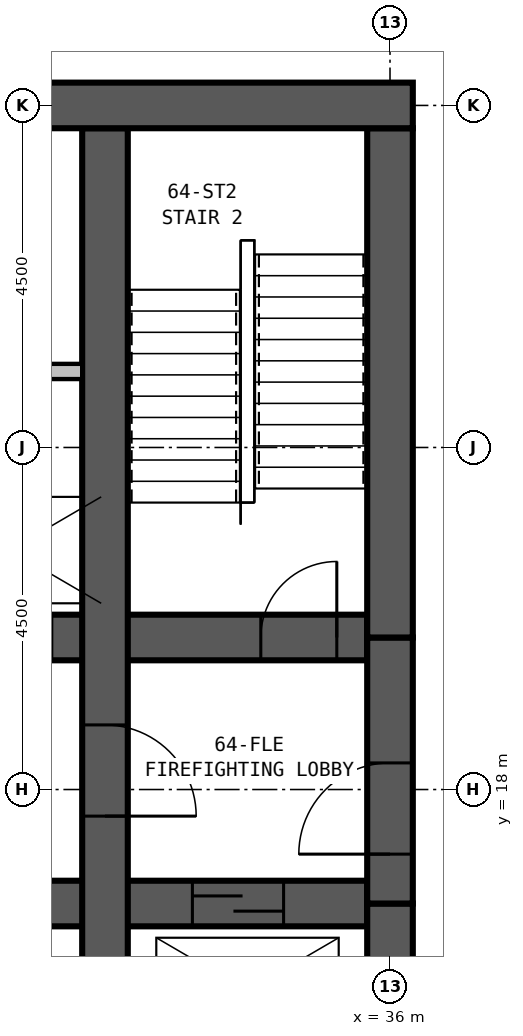
"""IFC4 building model, lengths in metres.
Left out: names, types, materials, properties, quantities, classifications, styles, units other than length and angle.
Written with IfcOpenShell. Run it as: python <this file> out.ifc"""

import sys

from ifc_helpers import new_model, si_unit, direction, frame, frame_2d, origin, place, context, subcontext, project, spatial, rectangle, extrude, element, fill, save


model = new_model("IFC4")
c1 = context("Model", 3, precision=1e-05, world=origin(), true_north=direction((0.0, 1.0)))
c2 = subcontext(c1, "Body", "Model", "MODEL_VIEW")
j1 = project(units=[si_unit("LENGTHUNIT", "METRE"), si_unit("PLANEANGLEUNIT", "RADIAN")], contexts=[c1])
p1 = place(None, origin())
s1 = spatial("IfcSite", under=j1, at=p1, CompositionType="ELEMENT")
p2 = place(p1, origin())
s2 = spatial("IfcBuilding", under=s1, at=p2, CompositionType="ELEMENT")
p3 = place(p2, frame((0.0, 0.0, 250.7)))
s3 = spatial("IfcBuildingStorey", under=s2, at=p3, CompositionType="ELEMENT", Elevation=250.7)
p4 = place(p3, frame((36.3, 27.0, 0.0), z_axis=(0.0, 0.0, 1.0), x_axis=(-1.0, 0.0, 0.0)))
e1 = element("IfcWall", 1, at=p4, inside=s3, PredefinedType="SHEAR", context=c2, shape_type="SweptSolid", body=[
    extrude(rectangle(XDim=23.6, YDim=0.6, at=frame_2d((11.8, 0.0))), origin(), (0.0, 0.0, 1.0), 3.9),
])
p5 = place(p4, frame((17.05, 0.0, 0.0)))
e2 = element("IfcOpeningElement", 2, at=p5, cuts=e1, PredefinedType="OPENING", context=c2, shape_type="SweptSolid", body=[
    extrude(rectangle(XDim=1.0, YDim=2.1, at=frame_2d((0.5, 1.05))), frame((0.0, 0.31, 0.0), z_axis=(0.0, -1.0, 0.0), x_axis=(1.0, 0.0, 0.0)), (0.0, 0.0, 1.0), 0.62),
])
p6 = place(p4, frame((12.05, 0.0, 0.0)))
e3 = element("IfcOpeningElement", 3, at=p6, cuts=e1, PredefinedType="OPENING", context=c2, shape_type="SweptSolid", body=[
    extrude(rectangle(XDim=1.0, YDim=2.1, at=frame_2d((0.5, 1.05))), frame((0.0, 0.31, 0.0), z_axis=(0.0, -1.0, 0.0), x_axis=(1.0, 0.0, 0.0)), (0.0, 0.0, 1.0), 0.62),
])
p7 = place(p4, frame((7.05, 0.0, 0.0)))
e4 = element("IfcOpeningElement", 4, at=p7, cuts=e1, PredefinedType="OPENING", context=c2, shape_type="SweptSolid", body=[
    extrude(rectangle(XDim=1.0, YDim=2.1, at=frame_2d((0.5, 1.05))), frame((0.0, 0.31, 0.0), z_axis=(0.0, -1.0, 0.0), x_axis=(1.0, 0.0, 0.0)), (0.0, 0.0, 1.0), 0.62),
])
p8 = place(p3, frame((32.25, 13.8, 0.0), z_axis=(0.0, 0.0, 1.0), x_axis=(0.0, 1.0, 0.0)))
e5 = element("IfcWall", 5, at=p8, inside=s3, PredefinedType="SHEAR", context=c2, shape_type="SweptSolid", body=[
    extrude(rectangle(XDim=12.9, YDim=0.6, at=frame_2d((6.45, 0.0))), origin(), (0.0, 0.0, 1.0), 3.9),
])
p9 = place(p8, frame((5.05, 0.0, 0.0), z_axis=(0.0, 0.0, 1.0), x_axis=(-1.0, 0.0, 0.0)))
e6 = element("IfcOpeningElement", 6, at=p9, cuts=e5, PredefinedType="OPENING", context=c2, shape_type="SweptSolid", body=[
    extrude(rectangle(XDim=1.2, YDim=2.1, at=frame_2d((0.6, 1.05))), frame((0.0, 0.31, 0.0), z_axis=(0.0, -1.0, 0.0), x_axis=(1.0, 0.0, 0.0)), (0.0, 0.0, 1.0), 0.62),
])
p10 = place(p3, frame((13.8, 16.5, 0.0), z_axis=(0.0, 0.0, 1.0), x_axis=(1.0, 0.0, 0.0)))
e7 = element("IfcWall", 7, at=p10, inside=s3, PredefinedType="SHEAR", context=c2, shape_type="SweptSolid", body=[
    extrude(rectangle(XDim=21.9, YDim=0.6, at=frame_2d((10.95, 0.0))), origin(), (0.0, 0.0, 1.0), 3.9),
])
p11 = place(p10, frame((5.75, 0.0, 0.0), z_axis=(0.0, 0.0, 1.0), x_axis=(-1.0, 0.0, 0.0)))
e8 = element("IfcOpeningElement", 8, at=p11, cuts=e7, PredefinedType="OPENING", context=c2, shape_type="SweptSolid", body=[
    extrude(rectangle(XDim=1.0, YDim=2.1, at=frame_2d((0.5, 1.05))), frame((0.0, 0.31, 0.0), z_axis=(0.0, -1.0, 0.0), x_axis=(1.0, 0.0, 0.0)), (0.0, 0.0, 1.0), 0.62),
])
p12 = place(p10, frame((10.2, 0.0, 0.0), z_axis=(0.0, 0.0, 1.0), x_axis=(-1.0, 0.0, 0.0)))
e9 = element("IfcOpeningElement", 9, at=p12, cuts=e7, PredefinedType="OPENING", context=c2, shape_type="SweptSolid", body=[
    extrude(rectangle(XDim=1.0, YDim=2.1, at=frame_2d((0.5, 1.05))), frame((0.0, 0.31, 0.0), z_axis=(0.0, -1.0, 0.0), x_axis=(1.0, 0.0, 0.0)), (0.0, 0.0, 1.0), 0.62),
])
p13 = place(p10, frame((12.7, 0.0, 0.0), z_axis=(0.0, 0.0, 1.0), x_axis=(-1.0, 0.0, 0.0)))
e10 = element("IfcOpeningElement", 10, at=p13, cuts=e7, PredefinedType="OPENING", context=c2, shape_type="SweptSolid", body=[
    extrude(rectangle(XDim=1.0, YDim=2.1, at=frame_2d((0.5, 1.05))), frame((0.0, 0.31, 0.0), z_axis=(0.0, -1.0, 0.0), x_axis=(1.0, 0.0, 0.0)), (0.0, 0.0, 1.0), 0.62),
])
p14 = place(p10, frame((17.15, 0.0, 0.0), z_axis=(0.0, 0.0, 1.0), x_axis=(-1.0, 0.0, 0.0)))
e11 = element("IfcOpeningElement", 11, at=p14, cuts=e7, PredefinedType="OPENING", context=c2, shape_type="SweptSolid", body=[
    extrude(rectangle(XDim=1.0, YDim=2.1, at=frame_2d((0.5, 1.05))), frame((0.0, 0.31, 0.0), z_axis=(0.0, -1.0, 0.0), x_axis=(1.0, 0.0, 0.0)), (0.0, 0.0, 1.0), 0.62),
])
p15 = place(p10, frame((0.6, 0.0, 0.0)))
e12 = element("IfcOpeningElement", 12, at=p15, cuts=e7, PredefinedType="OPENING", context=c2, shape_type="SweptSolid", body=[
    extrude(rectangle(XDim=1.2, YDim=2.1, at=frame_2d((0.6, 1.05))), frame((0.0, 0.31, 0.0), z_axis=(0.0, -1.0, 0.0), x_axis=(1.0, 0.0, 0.0)), (0.0, 0.0, 1.0), 0.62),
])
p16 = place(p10, frame((19.6, 0.0, 0.0)))
e13 = element("IfcOpeningElement", 13, at=p16, cuts=e7, PredefinedType="OPENING", context=c2, shape_type="SweptSolid", body=[
    extrude(rectangle(XDim=1.2, YDim=2.1, at=frame_2d((0.6, 1.05))), frame((0.0, 0.31, 0.0), z_axis=(0.0, -1.0, 0.0), x_axis=(1.0, 0.0, 0.0)), (0.0, 0.0, 1.0), 0.62),
])
p17 = place(p3, frame((13.8, 20.0, 0.0), z_axis=(0.0, 0.0, 1.0), x_axis=(1.0, 0.0, 0.0)))
e14 = element("IfcWall", 14, at=p17, inside=s3, PredefinedType="SHEAR", context=c2, shape_type="SweptSolid", body=[
    extrude(rectangle(XDim=21.9, YDim=0.6, at=frame_2d((10.95, 0.0))), origin(), (0.0, 0.0, 1.0), 3.9),
])
p18 = place(p17, frame((0.5, 0.0, 0.0)))
e15 = element("IfcOpeningElement", 15, at=p18, cuts=e14, PredefinedType="OPENING", context=c2, shape_type="SweptSolid", body=[
    extrude(rectangle(XDim=1.0, YDim=2.1, at=frame_2d((0.5, 1.05))), frame((0.0, 0.31, 0.0), z_axis=(0.0, -1.0, 0.0), x_axis=(1.0, 0.0, 0.0)), (0.0, 0.0, 1.0), 0.62),
])
p19 = place(p17, frame((20.5, 0.0, 0.0)))
e16 = element("IfcOpeningElement", 16, at=p19, cuts=e14, PredefinedType="OPENING", context=c2, shape_type="SweptSolid", body=[
    extrude(rectangle(XDim=1.0, YDim=2.1, at=frame_2d((0.5, 1.05))), frame((0.0, 0.31, 0.0), z_axis=(0.0, -1.0, 0.0), x_axis=(1.0, 0.0, 0.0)), (0.0, 0.0, 1.0), 0.62),
])
p20 = place(p17, frame((9.15, 0.0, 0.0)))
e17 = element("IfcOpeningElement", 17, at=p20, cuts=e14, PredefinedType="OPENING", context=c2, shape_type="SweptSolid", body=[
    extrude(rectangle(XDim=1.1, YDim=2.1, at=frame_2d((0.55, 1.05))), frame((0.0, 0.31, 0.0), z_axis=(0.0, -1.0, 0.0), x_axis=(1.0, 0.0, 0.0)), (0.0, 0.0, 1.0), 0.62),
])
p21 = place(p17, frame((11.65, 0.0, 0.0)))
e18 = element("IfcOpeningElement", 18, at=p21, cuts=e14, PredefinedType="OPENING", context=c2, shape_type="SweptSolid", body=[
    extrude(rectangle(XDim=1.1, YDim=2.1, at=frame_2d((0.55, 1.05))), frame((0.0, 0.31, 0.0), z_axis=(0.0, -1.0, 0.0), x_axis=(1.0, 0.0, 0.0)), (0.0, 0.0, 1.0), 0.62),
])
p22 = place(p17, frame((14.15, 0.0, 0.0)))
e19 = element("IfcOpeningElement", 19, at=p22, cuts=e14, PredefinedType="OPENING", context=c2, shape_type="SweptSolid", body=[
    extrude(rectangle(XDim=1.1, YDim=2.1, at=frame_2d((0.55, 1.05))), frame((0.0, 0.31, 0.0), z_axis=(0.0, -1.0, 0.0), x_axis=(1.0, 0.0, 0.0)), (0.0, 0.0, 1.0), 0.62),
])
p23 = place(p17, frame((16.65, 0.0, 0.0)))
e20 = element("IfcOpeningElement", 20, at=p23, cuts=e14, PredefinedType="OPENING", context=c2, shape_type="SweptSolid", body=[
    extrude(rectangle(XDim=1.1, YDim=2.1, at=frame_2d((0.55, 1.05))), frame((0.0, 0.31, 0.0), z_axis=(0.0, -1.0, 0.0), x_axis=(1.0, 0.0, 0.0)), (0.0, 0.0, 1.0), 0.62),
])
p24 = place(p17, frame((5.75, 0.0, 0.0), z_axis=(0.0, 0.0, 1.0), x_axis=(-1.0, 0.0, 0.0)))
e21 = element("IfcOpeningElement", 21, at=p24, cuts=e14, PredefinedType="OPENING", context=c2, shape_type="SweptSolid", body=[
    extrude(rectangle(XDim=1.0, YDim=2.1, at=frame_2d((0.5, 1.05))), frame((0.0, 0.31, 0.0), z_axis=(0.0, -1.0, 0.0), x_axis=(1.0, 0.0, 0.0)), (0.0, 0.0, 1.0), 0.62),
])
p25 = place(p17, frame((6.7, 0.0, 0.0)))
e22 = element("IfcOpeningElement", 22, at=p25, cuts=e14, PredefinedType="OPENING", context=c2, shape_type="SweptSolid", body=[
    extrude(rectangle(XDim=1.0, YDim=2.1, at=frame_2d((0.5, 1.05))), frame((0.0, 0.31, 0.0), z_axis=(0.0, -1.0, 0.0), x_axis=(1.0, 0.0, 0.0)), (0.0, 0.0, 1.0), 0.62),
])
p26 = place(p3, frame((36.0, 13.8, 0.0), z_axis=(0.0, 0.0, 1.0), x_axis=(0.0, 1.0, 0.0)))
e23 = element("IfcWall", 23, at=p26, inside=s3, PredefinedType="SHEAR", context=c2, shape_type="SweptSolid", body=[
    extrude(rectangle(XDim=2.7, YDim=0.6, at=frame_2d((1.35, 0.0))), origin(), (0.0, 0.0, 1.0), 3.9),
])
p27 = place(p3, frame((36.0, 16.5, 0.0), z_axis=(0.0, 0.0, 1.0), x_axis=(0.0, 1.0, 0.0)))
e24 = element("IfcWall", 24, at=p27, inside=s3, PredefinedType="SHEAR", context=c2, shape_type="SweptSolid", body=[
    extrude(rectangle(XDim=3.5, YDim=0.6, at=frame_2d((1.75, 0.0))), origin(), (0.0, 0.0, 1.0), 3.9),
])
p28 = place(p27, frame((0.65, 0.0, 0.0)))
e25 = element("IfcOpeningElement", 25, at=p28, cuts=e24, PredefinedType="OPENING", context=c2, shape_type="SweptSolid", body=[
    extrude(rectangle(XDim=1.2, YDim=2.1, at=frame_2d((0.6, 1.05))), frame((0.0, 0.31, 0.0), z_axis=(0.0, -1.0, 0.0), x_axis=(1.0, 0.0, 0.0)), (0.0, 0.0, 1.0), 0.62),
])
p29 = place(p3, frame((36.0, 20.0, 0.0), z_axis=(0.0, 0.0, 1.0), x_axis=(0.0, 1.0, 0.0)))
e26 = element("IfcWall", 26, at=p29, inside=s3, PredefinedType="SHEAR", context=c2, shape_type="SweptSolid", body=[
    extrude(rectangle(XDim=6.7, YDim=0.6, at=frame_2d((3.35, 0.0))), origin(), (0.0, 0.0, 1.0), 3.9),
])
p30 = place(p3, frame((17.55, 23.5, 0.0), z_axis=(0.0, 0.0, 1.0), x_axis=(1.0, 0.0, 0.0)))
e27 = element("IfcWall", 27, at=p30, inside=s3, PredefinedType="PARTITIONING", context=c2, shape_type="SweptSolid", body=[
    extrude(rectangle(XDim=14.4, YDim=0.2, at=frame_2d((7.2, 0.0))), origin(), (0.0, 0.0, 1.0), 3.65),
])
p31 = place(p30, frame((0.45, 0.0, 0.0)))
e28 = element("IfcOpeningElement", 28, at=p31, cuts=e27, PredefinedType="OPENING", context=c2, shape_type="SweptSolid", body=[
    extrude(rectangle(XDim=1.0, YDim=2.1, at=frame_2d((0.5, 1.05))), frame((0.0, 0.11, 0.0), z_axis=(0.0, -1.0, 0.0), x_axis=(1.0, 0.0, 0.0)), (0.0, 0.0, 1.0), 0.22),
])
p32 = place(p28, origin())
e29 = element("IfcDoor", 29, at=p32, inside=s3, OperationType="SINGLE_SWING_LEFT", PredefinedType="DOOR", context=c2, shape_type="SweptSolid", body=[
    extrude(rectangle(XDim=1.2, YDim=2.1, at=frame_2d((0.6, 1.05))), frame((0.0, 0.3, 0.0), z_axis=(0.0, -1.0, 0.0), x_axis=(1.0, 0.0, 0.0)), (0.0, 0.0, 1.0), 0.6),
])
fill(e25, e29)
p33 = place(p9, origin())
e30 = element("IfcDoor", 30, at=p33, inside=s3, OperationType="SINGLE_SWING_RIGHT", PredefinedType="DOOR", context=c2, shape_type="SweptSolid", body=[
    extrude(rectangle(XDim=1.2, YDim=2.1, at=frame_2d((0.6, 1.05))), frame((0.0, 0.3, 0.0), z_axis=(0.0, -1.0, 0.0), x_axis=(1.0, 0.0, 0.0)), (0.0, 0.0, 1.0), 0.6),
])
fill(e6, e30)
p34 = place(p19, origin())
e31 = element("IfcDoor", 31, at=p34, inside=s3, OperationType="SINGLE_SWING_RIGHT", PredefinedType="DOOR", context=c2, shape_type="SweptSolid", body=[
    extrude(rectangle(XDim=1.0, YDim=2.1, at=frame_2d((0.5, 1.05))), frame((0.0, 0.3, 0.0), z_axis=(0.0, -1.0, 0.0), x_axis=(1.0, 0.0, 0.0)), (0.0, 0.0, 1.0), 0.6),
])
fill(e16, e31)
p35 = place(p16, origin())
e32 = element("IfcDoor", 32, at=p35, inside=s3, OperationType="SLIDING_TO_LEFT", PredefinedType="DOOR", context=c2, shape_type="SweptSolid", body=[
    extrude(rectangle(XDim=1.2, YDim=2.1, at=frame_2d((0.6, 1.05))), frame((0.0, 0.3, 0.0), z_axis=(0.0, -1.0, 0.0), x_axis=(1.0, 0.0, 0.0)), (0.0, 0.0, 1.0), 0.6),
])
fill(e13, e32)
save(model, sys.argv[1])
